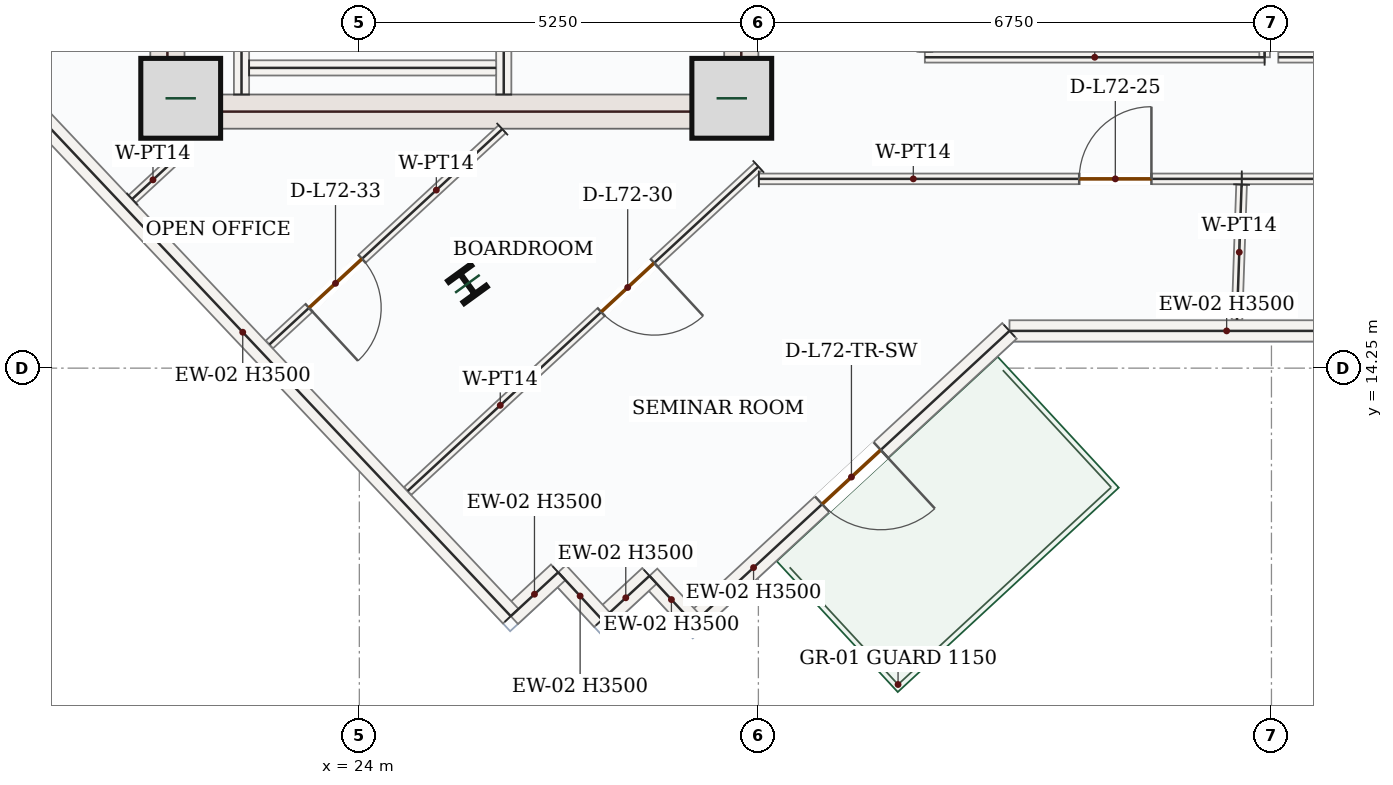
"""IFC4 building model, lengths in metres.
Left out: names, types, materials, properties, quantities, classifications, styles, units other than length and angle.
Written with IfcOpenShell. Run it as: python <this file> out.ifc"""

import sys

from ifc_helpers import new_model, si_unit, direction, frame, frame_2d, origin, origin_2d, place, context, subcontext, project, spatial, rectangle, i_section, extrude, source, transform, mapped, element, fill, save


model = new_model("IFC4")
c1 = context("Model", 3, precision=1e-05, world=origin(), true_north=direction((0.0, 1.0)))
c2 = subcontext(c1, "Body", "Model", "MODEL_VIEW")
j1 = project(units=[si_unit("LENGTHUNIT", "METRE"), si_unit("PLANEANGLEUNIT", "RADIAN")], contexts=[c1])
p1 = place(None, origin())
s1 = spatial("IfcSite", under=j1, at=p1, CompositionType="ELEMENT")
p2 = place(p1, origin())
s2 = spatial("IfcBuilding", under=s1, at=p2, CompositionType="ELEMENT")
p3 = place(p2, frame((0.0, 0.0, 299.1)))
s3 = spatial("IfcBuildingStorey", under=s2, at=p3, CompositionType="ELEMENT", Elevation=299.1)
m1 = source(origin(), c2, "Body", "SweptSolid", [
    extrude(rectangle(XDim=8.55, YDim=0.45, at=frame_2d((4.275, 0.0))), origin(), (0.0, 0.0, 1.0), 3.5),
])
p4 = place(p3, frame((21.475, 17.4, 0.0), z_axis=(0.0, 0.0, 1.0), x_axis=(0.0, 1.0, 0.0)))
e1 = element("IfcWall", 1, at=p4, inside=s3, PredefinedType="SHEAR", context=c2, shape_type="MappedRepresentation", body=[
    mapped(m1, transform((0.0, 0.0, 0.0), x_axis=(1.0, 0.0, 0.0), y_axis=(0.0, 1.0, 0.0), z_axis=(0.0, 0.0, 1.0), scale=1.0)),
])
p5 = place(p3, frame((29.025, 17.4, 0.0), z_axis=(0.0, 0.0, 1.0), x_axis=(0.0, 1.0, 0.0)))
e2 = element("IfcWall", 2, at=p5, inside=s3, PredefinedType="SHEAR", context=c2, shape_type="SweptSolid", body=[
    extrude(rectangle(XDim=8.55, YDim=0.45, at=frame_2d((4.275, 0.0))), origin(), (0.0, 0.0, 1.0), 3.5),
])
p6 = place(p5, frame((6.65, 0.0, 0.0)))
e3 = element("IfcOpeningElement", 3, at=p6, cuts=e2, PredefinedType="OPENING", context=c2, shape_type="SweptSolid", body=[
    extrude(rectangle(XDim=1.1, YDim=2.2, at=frame_2d((0.55, 1.1))), frame((0.0, 0.235, 0.0), z_axis=(0.0, -1.0, 0.0), x_axis=(1.0, 0.0, 0.0)), (0.0, 0.0, 1.0), 0.47),
])
p7 = place(p5, frame((2.15, 0.0, 0.0)))
e4 = element("IfcOpeningElement", 4, at=p7, cuts=e2, PredefinedType="OPENING", context=c2, shape_type="SweptSolid", body=[
    extrude(rectangle(XDim=0.88, YDim=2.1, at=frame_2d((0.44, 1.05))), frame((0.0, 0.235, 0.0), z_axis=(0.0, -1.0, 0.0), x_axis=(1.0, 0.0, 0.0)), (0.0, 0.0, 1.0), 0.47),
])
p8 = place(p5, frame((4.25, 0.0, 0.0)))
e5 = element("IfcOpeningElement", 5, at=p8, cuts=e2, PredefinedType="OPENING", context=c2, shape_type="SweptSolid", body=[
    extrude(rectangle(XDim=0.88, YDim=2.1, at=frame_2d((0.44, 1.05))), frame((0.0, 0.235, 0.0), z_axis=(0.0, -1.0, 0.0), x_axis=(1.0, 0.0, 0.0)), (0.0, 0.0, 1.0), 0.47),
])
m2 = source(origin(), c2, "Body", "SweptSolid", [
    extrude(rectangle(XDim=7.1, YDim=0.45, at=frame_2d((3.55, 0.0))), origin(), (0.0, 0.0, 1.0), 3.5),
])
p9 = place(p3, frame((21.7, 17.625, 0.0), z_axis=(0.0, 0.0, 1.0), x_axis=(1.0, 0.0, 0.0)))
e6 = element("IfcWall", 6, at=p9, inside=s3, PredefinedType="SHEAR", context=c2, shape_type="MappedRepresentation", body=[
    mapped(m2, transform((0.0, 0.0, 0.0), x_axis=(1.0, 0.0, 0.0), y_axis=(0.0, 1.0, 0.0), z_axis=(0.0, 0.0, 1.0), scale=1.0)),
])
m3 = source(origin(), c2, "Body", "SweptSolid", [
    extrude(rectangle(XDim=1.05, YDim=1.05, at=origin_2d()), origin(), (0.0, 0.0, 1.0), 3.75),
])
for number, where, z_axis, x_axis in (
    (7, (21.65, 17.8, 0.0), (0.0, 0.0, 1.0), (1.0, 0.0, 0.0)),
    (8, (28.9, 17.8, 0.0), (0.0, 0.0, 1.0), (1.0, 0.0, 0.0)),
):
    element("IfcColumn", number, at=place(p3, frame(where, z_axis=z_axis, x_axis=x_axis)), inside=s3, PredefinedType="COLUMN", context=c2, shape_type="MappedRepresentation", body=[
        mapped(m3, transform((0.0, 0.0, 0.0), x_axis=(1.0, 0.0, 0.0), y_axis=(0.0, 1.0, 0.0), z_axis=(0.0, 0.0, 1.0), scale=1.0)),
    ])
m4 = source(origin(), c2, "Body", "SweptSolid", [
    extrude(i_section(OverallWidth=0.374, OverallDepth=0.372, WebThickness=0.016, FlangeThickness=0.026, FilletRadius=0.018, at=origin_2d()), origin(), (0.0, 0.0, 1.0), 3.75),
])
p10 = place(p3, frame((25.422, 15.359, 0.0), z_axis=(0.0, 0.0, 1.0), x_axis=(0.809016994375, 0.587785252292, 0.0)))
e9 = element("IfcColumn", 9, at=p10, inside=s3, PredefinedType="COLUMN", context=c2, shape_type="MappedRepresentation", body=[
    mapped(m4, transform((0.0, 0.0, 0.0), x_axis=(1.0, 0.0, 0.0), y_axis=(0.0, 1.0, 0.0), z_axis=(0.0, 0.0, 1.0), scale=1.0)),
])
m5 = source(origin(), c2, "Body", "SweptSolid", [
    extrude(rectangle(XDim=5.714, YDim=0.28, at=frame_2d((2.857, 0.0))), origin(), (0.0, 0.0, 1.0), 3.5),
])
p11 = place(p3, frame((38.268, 14.74, 0.0), z_axis=(0.0, 0.0, 1.0), x_axis=(-1.0, 0.0, 0.0)))
e10 = element("IfcWall", 10, at=p11, inside=s3, PredefinedType="SOLIDWALL", context=c2, shape_type="MappedRepresentation", body=[
    mapped(m5, transform((0.0, 0.0, 0.0), x_axis=(1.0, 0.0, 0.0), y_axis=(0.0, 1.0, 0.0), z_axis=(0.0, 0.0, 1.0), scale=1.0)),
])
p12 = place(p3, frame((32.553, 14.74, 0.0), z_axis=(0.0, 0.0, 1.0), x_axis=(-0.734109106874, -0.679031530346, 0.0)))
e11 = element("IfcWall", 11, at=p12, inside=s3, PredefinedType="SOLIDWALL", context=c2, shape_type="SweptSolid", body=[
    extrude(rectangle(XDim=5.665, YDim=0.28, at=frame_2d((2.833, 0.0))), origin(), (0.0, 0.0, 1.0), 3.5),
])
p13 = place(p12, frame((2.307, 0.0, 0.0)))
e12 = element("IfcOpeningElement", 12, at=p13, cuts=e11, PredefinedType="OPENING", context=c2, shape_type="SweptSolid", body=[
    extrude(rectangle(XDim=1.05, YDim=2.15, at=frame_2d((0.525, 1.075))), frame((0.0, 0.15, 0.0), z_axis=(0.0, -1.0, 0.0), x_axis=(1.0, 0.0, 0.0)), (0.0, 0.0, 1.0), 0.3),
])
m6 = source(origin(), c2, "Body", "SweptSolid", [
    extrude(rectangle(XDim=0.85, YDim=0.28, at=frame_2d((0.425, 0.0))), origin(), (0.0, 0.0, 1.0), 3.5),
])
for number, where, z_axis, x_axis in (
    (13, (28.395, 10.893, 0.0), (0.0, 0.0, 1.0), (-0.679, 0.734, 0.0)),
    (14, (27.817, 11.517, 0.0), (0.0, 0.0, 1.0), (-0.734, -0.679, 0.0)),
    (15, (27.193, 10.94, 0.0), (0.0, 0.0, 1.0), (-0.679, 0.734, 0.0)),
    (16, (26.616, 11.564, 0.0), (0.0, 0.0, 1.0), (-0.734, -0.679, 0.0)),
):
    element("IfcWall", number, at=place(p3, frame(where, z_axis=z_axis, x_axis=x_axis)), inside=s3, PredefinedType="SOLIDWALL", context=c2, shape_type="MappedRepresentation", body=[
        mapped(m6, transform((0.0, 0.0, 0.0), x_axis=(1.0, 0.0, 0.0), y_axis=(0.0, 1.0, 0.0), z_axis=(0.0, 0.0, 1.0), scale=1.0)),
    ])
m7 = source(origin(), c2, "Body", "SweptSolid", [
    extrude(rectangle(XDim=10.274, YDim=0.28, at=frame_2d((5.137, 0.0))), origin(), (0.0, 0.0, 1.0), 3.5),
])
p14 = place(p3, frame((25.992, 10.987, 0.0), z_axis=(0.0, 0.0, 1.0), x_axis=(-0.68643580465, 0.727190405667, 0.0)))
e17 = element("IfcWall", 17, at=p14, inside=s3, PredefinedType="SOLIDWALL", context=c2, shape_type="MappedRepresentation", body=[
    mapped(m7, transform((0.0, 0.0, 0.0), x_axis=(1.0, 0.0, 0.0), y_axis=(0.0, 1.0, 0.0), z_axis=(0.0, 0.0, 1.0), scale=1.0)),
])
m8 = source(origin(), c2, "Body", "SweptSolid", [
    extrude(rectangle(XDim=7.87, YDim=0.2, at=frame_2d((3.935, 0.0))), origin(), (0.0, 0.0, 1.0), 3.5),
])
p15 = place(p3, frame((22.45, 17.85, 0.0), z_axis=(0.0, 0.0, 1.0), x_axis=(0.0, 1.0, 0.0)))
e18 = element("IfcWall", 18, at=p15, inside=s3, PredefinedType="SOLIDWALL", context=c2, shape_type="MappedRepresentation", body=[
    mapped(m8, transform((0.0, 0.0, 0.0), x_axis=(1.0, 0.0, 0.0), y_axis=(0.0, 1.0, 0.0), z_axis=(0.0, 0.0, 1.0), scale=1.0)),
])
p16 = place(p3, frame((25.9, 17.85, 0.0), z_axis=(0.0, 0.0, 1.0), x_axis=(0.0, 1.0, 0.0)))
e19 = element("IfcWall", 19, at=p16, inside=s3, PredefinedType="SOLIDWALL", context=c2, shape_type="SweptSolid", body=[
    extrude(rectangle(XDim=8.0, YDim=0.2, at=frame_2d((4.0, 0.0))), origin(), (0.0, 0.0, 1.0), 3.5),
])
p17 = place(p16, frame((6.2, 0.0, 0.0)))
e20 = element("IfcOpeningElement", 20, at=p17, cuts=e19, PredefinedType="OPENING", context=c2, shape_type="SweptSolid", body=[
    extrude(rectangle(XDim=1.0, YDim=2.15, at=frame_2d((0.5, 1.075))), frame((0.0, 0.11, 0.0), z_axis=(0.0, -1.0, 0.0), x_axis=(1.0, 0.0, 0.0)), (0.0, 0.0, 1.0), 0.22),
])
p18 = place(p16, frame((0.6, 0.0, 0.0)))
e21 = element("IfcOpeningElement", 21, at=p18, cuts=e19, PredefinedType="OPENING", context=c2, shape_type="SweptSolid", body=[
    extrude(rectangle(XDim=0.88, YDim=2.1, at=frame_2d((0.44, 1.05))), frame((0.0, 0.11, 0.0), z_axis=(0.0, -1.0, 0.0), x_axis=(1.0, 0.0, 0.0)), (0.0, 0.0, 1.0), 0.22),
])
m9 = source(origin(), c2, "Body", "SweptSolid", [
    extrude(rectangle(XDim=3.25, YDim=0.2, at=frame_2d((1.625, 0.0))), origin(), (0.0, 0.0, 1.0), 3.5),
])
p19 = place(p3, frame((22.55, 18.2, 0.0), z_axis=(0.0, 0.0, 1.0), x_axis=(1.0, 0.0, 0.0)))
e22 = element("IfcWall", 22, at=p19, inside=s3, PredefinedType="SOLIDWALL", context=c2, shape_type="MappedRepresentation", body=[
    mapped(m9, transform((0.0, 0.0, 0.0), x_axis=(1.0, 0.0, 0.0), y_axis=(0.0, 1.0, 0.0), z_axis=(0.0, 0.0, 1.0), scale=1.0)),
])
p20 = place(p3, frame((25.881, 17.395, 0.0), z_axis=(0.0, 0.0, 1.0), x_axis=(-0.734127876216, -0.679011238024, 0.0)))
e23 = element("IfcWall", 23, at=p20, inside=s3, PredefinedType="PARTITIONING", context=c2, shape_type="SweptSolid", body=[
    extrude(rectangle(XDim=4.173, YDim=0.14, at=frame_2d((2.086, 0.0))), origin(), (0.0, 0.0, 1.0), 3.5),
])
p21 = place(p20, frame((2.514, 0.0, 0.0)))
e24 = element("IfcOpeningElement", 24, at=p21, cuts=e23, PredefinedType="OPENING", context=c2, shape_type="SweptSolid", body=[
    extrude(rectangle(XDim=0.95, YDim=2.15, at=frame_2d((0.475, 1.075))), frame((0.0, 0.08, 0.0), z_axis=(0.0, -1.0, 0.0), x_axis=(1.0, 0.0, 0.0)), (0.0, 0.0, 1.0), 0.16),
])
m10 = source(origin(), c2, "Body", "SweptSolid", [
    extrude(rectangle(XDim=0.745, YDim=0.14, at=frame_2d((0.373, 0.0))), origin(), (0.0, 0.0, 1.0), 3.5),
])
p22 = place(p3, frame((21.012, 16.474, 0.0), z_axis=(0.0, 0.0, 1.0), x_axis=(0.734262819455, 0.678865312095, 0.0)))
e25 = element("IfcWall", 25, at=p22, inside=s3, PredefinedType="PARTITIONING", context=c2, shape_type="MappedRepresentation", body=[
    mapped(m10, transform((0.0, 0.0, 0.0), x_axis=(1.0, 0.0, 0.0), y_axis=(0.0, 1.0, 0.0), z_axis=(0.0, 0.0, 1.0), scale=1.0)),
])
p23 = place(p3, frame((29.25, 16.902, 0.0), z_axis=(0.0, 0.0, 1.0), x_axis=(-0.734113479195, -0.679026803347, 0.0)))
e26 = element("IfcWall", 26, at=p23, inside=s3, PredefinedType="PARTITIONING", context=c2, shape_type="SweptSolid", body=[
    extrude(rectangle(XDim=6.284, YDim=0.14, at=frame_2d((3.142, 0.0))), origin(), (0.0, 0.0, 1.0), 3.5),
])
p24 = place(p23, frame((1.867, 0.0, 0.0)))
e27 = element("IfcOpeningElement", 27, at=p24, cuts=e26, PredefinedType="OPENING", context=c2, shape_type="SweptSolid", body=[
    extrude(rectangle(XDim=0.95, YDim=2.15, at=frame_2d((0.475, 1.075))), frame((0.0, 0.08, 0.0), z_axis=(0.0, -1.0, 0.0), x_axis=(1.0, 0.0, 0.0)), (0.0, 0.0, 1.0), 0.16),
])
m11 = source(origin(), c2, "Body", "SweptSolid", [
    extrude(rectangle(XDim=4.47, YDim=0.14, at=frame_2d((2.235, 0.0))), origin(), (0.0, 0.0, 1.0), 3.5),
])
p25 = place(p3, frame((35.91, 18.34, 0.0), z_axis=(0.0, 0.0, 1.0), x_axis=(-1.0, 0.0, 0.0)))
e28 = element("IfcWall", 28, at=p25, inside=s3, PredefinedType="PARTITIONING", context=c2, shape_type="MappedRepresentation", body=[
    mapped(m11, transform((0.0, 0.0, 0.0), x_axis=(1.0, 0.0, 0.0), y_axis=(0.0, 1.0, 0.0), z_axis=(0.0, 0.0, 1.0), scale=1.0)),
])
m12 = source(origin(), c2, "Body", "SweptSolid", [
    extrude(rectangle(XDim=7.47, YDim=0.14, at=frame_2d((3.735, 0.0))), origin(), (0.0, 0.0, 1.0), 3.5),
])
p26 = place(p3, frame((35.91, 25.81, 0.0), z_axis=(0.0, 0.0, 1.0), x_axis=(0.0, -1.0, 0.0)))
e29 = element("IfcWall", 29, at=p26, inside=s3, PredefinedType="PARTITIONING", context=c2, shape_type="MappedRepresentation", body=[
    mapped(m12, transform((0.0, 0.0, 0.0), x_axis=(1.0, 0.0, 0.0), y_axis=(0.0, 1.0, 0.0), z_axis=(0.0, 0.0, 1.0), scale=1.0)),
])
p27 = place(p3, frame((40.56, 18.34, 0.0), z_axis=(0.0, 0.0, 1.0), x_axis=(-1.0, 0.0, 0.0)))
e30 = element("IfcWall", 30, at=p27, inside=s3, PredefinedType="PARTITIONING", context=c2, shape_type="MappedRepresentation", body=[
    mapped(m11, transform((0.0, 0.0, 0.0), x_axis=(1.0, 0.0, 0.0), y_axis=(0.0, 1.0, 0.0), z_axis=(0.0, 0.0, 1.0), scale=1.0)),
])
p28 = place(p3, frame((29.256, 16.74, 0.0), z_axis=(0.0, 0.0, 1.0), x_axis=(1.0, 0.0, 0.0)))
e31 = element("IfcWall", 31, at=p28, inside=s3, PredefinedType="PARTITIONING", context=c2, shape_type="SweptSolid", body=[
    extrude(rectangle(XDim=6.354, YDim=0.14, at=frame_2d((3.177, 0.0))), origin(), (0.0, 0.0, 1.0), 3.5),
])
p29 = place(p28, frame((4.215, 0.0, 0.0)))
e32 = element("IfcOpeningElement", 32, at=p29, cuts=e31, PredefinedType="OPENING", context=c2, shape_type="SweptSolid", body=[
    extrude(rectangle(XDim=0.95, YDim=2.15, at=frame_2d((0.475, 1.075))), frame((0.0, 0.08, 0.0), z_axis=(0.0, -1.0, 0.0), x_axis=(1.0, 0.0, 0.0)), (0.0, 0.0, 1.0), 0.16),
])
m13 = source(origin(), c2, "Body", "SweptSolid", [
    extrude(rectangle(XDim=1.781, YDim=0.14, at=frame_2d((0.891, 0.0))), origin(), (0.0, 0.0, 1.0), 3.5),
])
p30 = place(p3, frame((35.607, 16.665, 0.0), z_axis=(0.0, 0.0, 1.0), x_axis=(-0.034268709891, -0.999412655274, 0.0)))
e33 = element("IfcWall", 33, at=p30, inside=s3, PredefinedType="PARTITIONING", context=c2, shape_type="MappedRepresentation", body=[
    mapped(m13, transform((0.0, 0.0, 0.0), x_axis=(1.0, 0.0, 0.0), y_axis=(0.0, 1.0, 0.0), z_axis=(0.0, 0.0, 1.0), scale=1.0)),
])
p31 = place(p3, frame((35.61, 16.74, 0.0), z_axis=(0.0, 0.0, 1.0), x_axis=(1.0, 0.0, 0.0)))
e34 = element("IfcWall", 34, at=p31, inside=s3, PredefinedType="PARTITIONING", context=c2, shape_type="SweptSolid", body=[
    extrude(rectangle(XDim=6.515, YDim=0.14, at=frame_2d((3.258, 0.0))), origin(), (0.0, 0.0, 1.0), 3.5),
])
p32 = place(p31, frame((1.224, 0.0, 0.0)))
e35 = element("IfcOpeningElement", 35, at=p32, cuts=e34, PredefinedType="OPENING", context=c2, shape_type="SweptSolid", body=[
    extrude(rectangle(XDim=0.95, YDim=2.15, at=frame_2d((0.475, 1.075))), frame((0.0, 0.08, 0.0), z_axis=(0.0, -1.0, 0.0), x_axis=(1.0, 0.0, 0.0)), (0.0, 0.0, 1.0), 0.16),
])
m14 = source(origin(), c2, "Body", "SweptSolid", [
    extrude(rectangle(XDim=1.05, YDim=2.15, at=frame_2d((0.525, 1.075))), frame((0.0, 0.025, 0.0), z_axis=(0.0, -1.0, 0.0), x_axis=(1.0, 0.0, 0.0)), (0.0, 0.0, 1.0), 0.05),
])
p33 = place(p13, origin())
e36 = element("IfcDoor", 36, at=p33, inside=s3, OperationType="SINGLE_SWING_LEFT", PredefinedType="DOOR", context=c2, shape_type="MappedRepresentation", body=[
    mapped(m14, transform((0.0, 0.0, 0.0), x_axis=(1.0, 0.0, 0.0), y_axis=(0.0, 1.0, 0.0), z_axis=(0.0, 0.0, 1.0), scale=1.0)),
])
fill(e12, e36)
m15 = source(origin(), c2, "Body", "SweptSolid", [
    extrude(rectangle(XDim=0.95, YDim=2.15, at=frame_2d((0.475, 1.075))), frame((0.0, 0.025, 0.0), z_axis=(0.0, -1.0, 0.0), x_axis=(1.0, 0.0, 0.0)), (0.0, 0.0, 1.0), 0.05),
])
p34 = place(p29, origin())
e37 = element("IfcDoor", 37, at=p34, inside=s3, OperationType="SINGLE_SWING_RIGHT", PredefinedType="DOOR", context=c2, shape_type="MappedRepresentation", body=[
    mapped(m15, transform((0.0, 0.0, 0.0), x_axis=(1.0, 0.0, 0.0), y_axis=(0.0, 1.0, 0.0), z_axis=(0.0, 0.0, 1.0), scale=1.0)),
])
fill(e32, e37)
p35 = place(p24, origin())
e38 = element("IfcDoor", 38, at=p35, inside=s3, OperationType="SINGLE_SWING_LEFT", PredefinedType="DOOR", context=c2, shape_type="MappedRepresentation", body=[
    mapped(m15, transform((0.0, 0.0, 0.0), x_axis=(1.0, 0.0, 0.0), y_axis=(0.0, 1.0, 0.0), z_axis=(0.0, 0.0, 1.0), scale=1.0)),
])
fill(e27, e38)
p36 = place(p21, origin())
e39 = element("IfcDoor", 39, at=p36, inside=s3, OperationType="SINGLE_SWING_RIGHT", PredefinedType="DOOR", context=c2, shape_type="MappedRepresentation", body=[
    mapped(m15, transform((0.0, 0.0, 0.0), x_axis=(1.0, 0.0, 0.0), y_axis=(0.0, 1.0, 0.0), z_axis=(0.0, 0.0, 1.0), scale=1.0)),
])
fill(e24, e39)
save(model, sys.argv[1])
